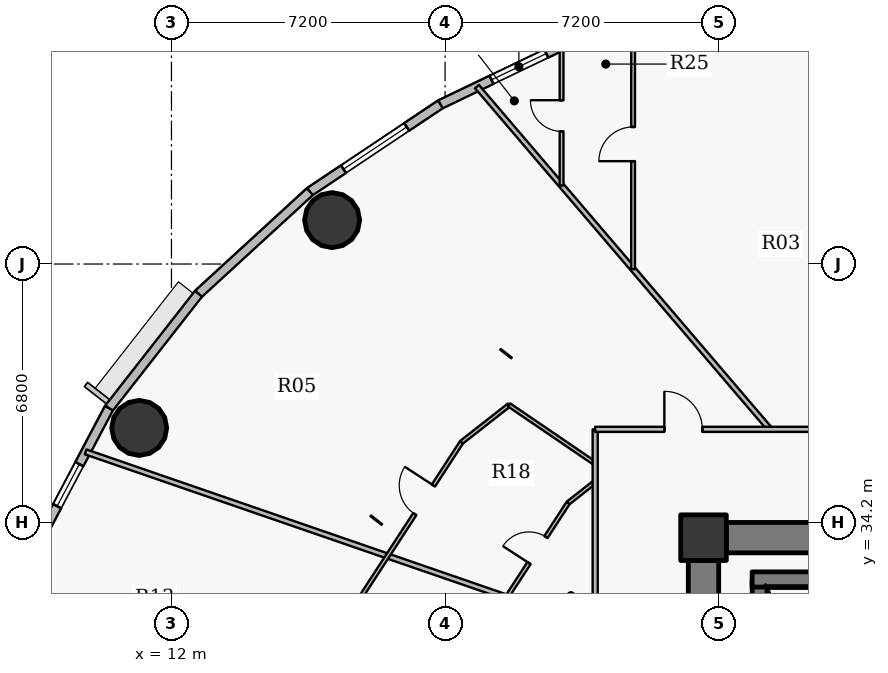
"""IFC4 building model, lengths in metres.
Left out: names, types, materials, properties, quantities, classifications, styles, units other than length and angle.
Written with IfcOpenShell. Run it as: python <this file> out.ifc"""

import sys

from ifc_helpers import new_model, si_unit, direction, frame, frame_2d, origin, origin_2d, place, context, subcontext, project, spatial, rectangle, hollow_circle, extrude, source, transform, mapped, element, fill, save


model = new_model("IFC4")
c1 = context("Model", 3, precision=1e-05, world=origin(), true_north=direction((0.0, 1.0)))
c2 = subcontext(c1, "Body", "Model", "MODEL_VIEW")
j1 = project(units=[si_unit("LENGTHUNIT", "METRE"), si_unit("PLANEANGLEUNIT", "RADIAN")], contexts=[c1])
p1 = place(None, origin())
s1 = spatial("IfcSite", under=j1, at=p1, CompositionType="ELEMENT")
p2 = place(p1, origin())
s2 = spatial("IfcBuilding", under=s1, at=p2, CompositionType="ELEMENT")
p3 = place(p2, frame((0.0, 0.0, 97.2)))
s3 = spatial("IfcBuildingStorey", under=s2, at=p3, CompositionType="ELEMENT", Elevation=97.2)
p4 = place(p3, frame((26.0, 33.8, 0.0), z_axis=(0.0, 0.0, 1.0), x_axis=(1.0, 0.0, 0.0)))
e1 = element("IfcColumn", 1, at=p4, inside=s3, PredefinedType="COLUMN", context=c2, shape_type="SweptSolid", body=[
    extrude(rectangle(XDim=1.2, YDim=1.2, at=origin_2d()), origin(), (0.0, 0.0, 1.0), 3.75),
])
p5 = place(p3, frame((27.48, 24.1, 0.0), z_axis=(0.0, 0.0, 1.0), x_axis=(0.0, 1.0, 0.0)))
e2 = element("IfcWall", 2, at=p5, inside=s3, PredefinedType="SHEAR", context=c2, shape_type="SweptSolid", body=[
    extrude(rectangle(XDim=8.6, YDim=0.4, at=frame_2d((4.3, 0.0))), origin(), (0.0, 0.0, 1.0), 3.75),
])
p6 = place(p3, frame((27.28, 32.7, 0.0), z_axis=(0.0, 0.0, 1.0), x_axis=(1.0, 0.0, 0.0)))
e3 = element("IfcWall", 3, at=p6, inside=s3, PredefinedType="SHEAR", context=c2, shape_type="SweptSolid", body=[
    extrude(rectangle(XDim=4.1, YDim=0.4, at=frame_2d((2.05, 0.0))), origin(), (0.0, 0.0, 1.0), 3.75),
])
p7 = place(p3, frame((26.6, 33.8, 0.0), z_axis=(0.0, 0.0, 1.0), x_axis=(1.0, 0.0, 0.0)))
e4 = element("IfcWall", 4, at=p7, inside=s3, PredefinedType="SHEAR", context=c2, shape_type="SweptSolid", body=[
    extrude(rectangle(XDim=18.8, YDim=0.8, at=frame_2d((9.4, 0.0))), origin(), (0.0, 0.0, 1.0), 2.95),
])
p8 = place(p3, frame((26.0, 20.8, 0.0), z_axis=(0.0, 0.0, 1.0), x_axis=(0.0, 1.0, 0.0)))
e5 = element("IfcWall", 5, at=p8, inside=s3, PredefinedType="SHEAR", context=c2, shape_type="SweptSolid", body=[
    extrude(rectangle(XDim=12.4, YDim=0.8, at=frame_2d((6.2, 0.0))), origin(), (0.0, 0.0, 1.0), 2.95),
])
p9 = place(p8, frame((5.79, 0.0, 0.0)))
e6 = element("IfcOpeningElement", 6, at=p9, cuts=e5, PredefinedType="OPENING", context=c2, shape_type="SweptSolid", body=[
    extrude(rectangle(XDim=0.82, YDim=2.1, at=origin_2d()), frame((0.41, 0.41, 1.05), z_axis=(0.0, -1.0, 0.0), x_axis=(1.0, 0.0, 0.0)), (0.0, 0.0, 1.0), 0.82),
])
for number, where, z_axis, x_axis in (
    (7, (16.227, 42.156, 0.0), (0.0, 0.0, 1.0), (1.0, 0.0, 0.0)),
    (8, (11.151, 36.688, 0.0), (0.0, 0.0, 1.0), (1.0, 0.0, 0.0)),
):
    element("IfcColumn", number, at=place(p3, frame(where, z_axis=z_axis, x_axis=x_axis)), inside=s3, PredefinedType="COLUMN", context=c2, shape_type="SweptSolid", body=[
        extrude(hollow_circle(Radius=0.725, WallThickness=0.042, at=origin_2d()), origin(), (0.0, 0.0, 1.0), 3.75),
    ])
p10 = place(p3, frame((19.075, 45.199, 0.0), z_axis=(0.0, 0.0, 1.0), x_axis=(0.901589935876, 0.432591709962, 0.0)))
e9 = element("IfcWall", 9, at=p10, inside=s3, PredefinedType="SOLIDWALL", context=c2, shape_type="SweptSolid", body=[
    extrude(rectangle(XDim=4.272, YDim=0.24, at=frame_2d((2.136, 0.0))), origin(), (0.0, 0.0, 1.0), 3.5),
])
p11 = place(p10, frame((1.493, 0.0, 0.9)))
e10 = element("IfcOpeningElement", 10, at=p11, cuts=e9, PredefinedType="OPENING", context=c2, shape_type="SweptSolid", body=[
    extrude(rectangle(XDim=1.6, YDim=1.75, at=origin_2d()), frame((0.8, 0.13, 0.875), z_axis=(0.0, -1.0, 0.0), x_axis=(1.0, 0.0, 0.0)), (0.0, 0.0, 1.0), 0.26),
])
p12 = place(p3, frame((15.642, 42.903, 0.0), z_axis=(0.0, 0.0, 1.0), x_axis=(0.831221811447, 0.555940914284, 0.0)))
e11 = element("IfcWall", 11, at=p12, inside=s3, PredefinedType="SOLIDWALL", context=c2, shape_type="SweptSolid", body=[
    extrude(rectangle(XDim=4.13, YDim=0.24, at=frame_2d((2.065, 0.0))), origin(), (0.0, 0.0, 1.0), 3.5),
])
p13 = place(p12, frame((1.065, 0.0, 0.9)))
e12 = element("IfcOpeningElement", 12, at=p13, cuts=e11, PredefinedType="OPENING", context=c2, shape_type="SweptSolid", body=[
    extrude(rectangle(XDim=2.0, YDim=1.75, at=origin_2d()), frame((1.0, 0.13, 0.875), z_axis=(0.0, -1.0, 0.0), x_axis=(1.0, 0.0, 0.0)), (0.0, 0.0, 1.0), 0.26),
])
p14 = place(p3, frame((12.711, 40.217, 0.0), z_axis=(0.0, 0.0, 1.0), x_axis=(0.737113356241, 0.675769117414, 0.0)))
e13 = element("IfcWall", 13, at=p14, inside=s3, PredefinedType="SOLIDWALL", context=c2, shape_type="SweptSolid", body=[
    extrude(rectangle(XDim=3.976, YDim=0.24, at=frame_2d((1.988, 0.0))), origin(), (0.0, 0.0, 1.0), 3.5),
])
p15 = place(p3, frame((10.355, 37.206, 0.0), z_axis=(0.0, 0.0, 1.0), x_axis=(0.616272103517, 0.787533297345, 0.0)))
e14 = element("IfcWall", 14, at=p15, inside=s3, PredefinedType="SOLIDWALL", context=c2, shape_type="SweptSolid", body=[
    extrude(rectangle(XDim=3.823, YDim=0.24, at=frame_2d((1.912, 0.0))), origin(), (0.0, 0.0, 1.0), 3.5),
])
p16 = place(p3, frame((8.63, 33.945, 0.0), z_axis=(0.0, 0.0, 1.0), x_axis=(0.467614004126, 0.883932770716, 0.0)))
e15 = element("IfcWall", 15, at=p16, inside=s3, PredefinedType="SOLIDWALL", context=c2, shape_type="SweptSolid", body=[
    extrude(rectangle(XDim=3.689, YDim=0.24, at=frame_2d((1.844, 0.0))), origin(), (0.0, 0.0, 1.0), 3.5),
])
p17 = place(p16, frame((0.774, 0.0, 0.9)))
e16 = element("IfcOpeningElement", 16, at=p17, cuts=e15, PredefinedType="OPENING", context=c2, shape_type="SweptSolid", body=[
    extrude(rectangle(XDim=1.25, YDim=1.65, at=origin_2d()), frame((0.625, 0.13, 0.825), z_axis=(0.0, -1.0, 0.0), x_axis=(1.0, 0.0, 0.0)), (0.0, 0.0, 1.0), 0.26),
])
p18 = place(p3, frame((9.741, 36.057, 0.0), z_axis=(0.0, 0.0, 1.0), x_axis=(0.945349748634, -0.326058051207, 0.0)))
e17 = element("IfcWall", 17, at=p18, inside=s3, PredefinedType="PARTITIONING", context=c2, shape_type="SweptSolid", body=[
    extrude(rectangle(XDim=14.184, YDim=0.135, at=frame_2d((7.092, 0.0))), origin(), (0.0, 0.0, 1.0), 2.935),
])
p19 = place(p3, frame((16.76, 31.895, 0.0), z_axis=(0.0, 0.0, 1.0), x_axis=(0.545405249109, 0.838172484781, 0.0)))
e18 = element("IfcWall", 18, at=p19, inside=s3, PredefinedType="PARTITIONING", context=c2, shape_type="SweptSolid", body=[
    extrude(rectangle(XDim=5.269, YDim=0.1, at=frame_2d((2.634, 0.0))), origin(), (0.0, 0.0, 1.0), 2.935),
])
p20 = place(p19, frame((3.012, 0.0, 0.0)))
e19 = element("IfcOpeningElement", 19, at=p20, cuts=e18, PredefinedType="OPENING", context=c2, shape_type="SweptSolid", body=[
    extrude(rectangle(XDim=0.9, YDim=2.1, at=origin_2d()), frame((0.45, 0.06, 1.05), z_axis=(0.0, -1.0, 0.0), x_axis=(1.0, 0.0, 0.0)), (0.0, 0.0, 1.0), 0.12),
])
p21 = place(p3, frame((19.634, 36.311, 0.0), z_axis=(0.0, 0.0, 1.0), x_axis=(0.787313775385, 0.616552527437, 0.0)))
e20 = element("IfcWall", 20, at=p21, inside=s3, PredefinedType="PARTITIONING", context=c2, shape_type="SweptSolid", body=[
    extrude(rectangle(XDim=1.59, YDim=0.1, at=frame_2d((0.795, 0.0))), origin(), (0.0, 0.0, 1.0), 3.5),
])
p22 = place(p3, frame((20.04, 45.668, 0.0), z_axis=(0.0, 0.0, 1.0), x_axis=(0.649828321201, -0.760081017369, 0.0)))
e21 = element("IfcWall", 21, at=p22, inside=s3, PredefinedType="PARTITIONING", context=c2, shape_type="SweptSolid", body=[
    extrude(rectangle(XDim=11.865, YDim=0.135, at=frame_2d((5.932, 0.0))), origin(), (0.0, 0.0, 1.0), 2.935),
])
p23 = place(p3, frame((20.825, 32.234, 0.0), z_axis=(0.0, 0.0, 1.0), x_axis=(0.545376787896, 0.838191004023, 0.0)))
e22 = element("IfcWall", 22, at=p23, inside=s3, PredefinedType="PARTITIONING", context=c2, shape_type="SweptSolid", body=[
    extrude(rectangle(XDim=2.96, YDim=0.1, at=frame_2d((1.48, 0.0))), origin(), (0.0, 0.0, 1.0), 2.935),
])
p24 = place(p23, frame((1.07, 0.0, 0.0)))
e23 = element("IfcOpeningElement", 23, at=p24, cuts=e22, PredefinedType="OPENING", context=c2, shape_type="SweptSolid", body=[
    extrude(rectangle(XDim=0.82, YDim=2.1, at=origin_2d()), frame((0.41, 0.06, 1.05), z_axis=(0.0, -1.0, 0.0), x_axis=(1.0, 0.0, 0.0)), (0.0, 0.0, 1.0), 0.12),
])
p25 = place(p3, frame((20.885, 37.291, 0.0), z_axis=(0.0, 0.0, 1.0), x_axis=(0.826581607155, -0.562816885596, 0.0)))
e24 = element("IfcWall", 24, at=p25, inside=s3, PredefinedType="PARTITIONING", context=c2, shape_type="SweptSolid", body=[
    extrude(rectangle(XDim=2.74, YDim=0.1, at=frame_2d((1.37, 0.0))), origin(), (0.0, 0.0, 1.0), 3.5),
])
p26 = place(p3, frame((22.265, 43.064, 0.0), z_axis=(0.0, 0.0, 1.0), x_axis=(0.0, 1.0, 0.0)))
e25 = element("IfcWall", 25, at=p26, inside=s3, PredefinedType="PARTITIONING", context=c2, shape_type="SweptSolid", body=[
    extrude(rectangle(XDim=3.671, YDim=0.1, at=frame_2d((1.836, 0.0))), origin(), (0.0, 0.0, 1.0), 2.935),
])
p27 = place(p26, frame((1.426, 0.0, 0.0)))
e26 = element("IfcOpeningElement", 26, at=p27, cuts=e25, PredefinedType="OPENING", context=c2, shape_type="SweptSolid", body=[
    extrude(rectangle(XDim=0.82, YDim=2.1, at=origin_2d()), frame((0.41, 0.06, 1.05), z_axis=(0.0, -1.0, 0.0), x_axis=(1.0, 0.0, 0.0)), (0.0, 0.0, 1.0), 0.12),
])
p28 = place(p3, frame((22.439, 34.715, 0.0), z_axis=(0.0, 0.0, 1.0), x_axis=(0.787265250498, 0.616614486821, 0.0)))
e27 = element("IfcWall", 27, at=p28, inside=s3, PredefinedType="PARTITIONING", context=c2, shape_type="SweptSolid", body=[
    extrude(rectangle(XDim=0.903, YDim=0.1, at=frame_2d((0.451, 0.0))), origin(), (0.0, 0.0, 1.0), 3.5),
])
p29 = place(p3, frame((23.15, 17.35, 0.0), z_axis=(0.0, 0.0, 1.0), x_axis=(0.0, 1.0, 0.0)))
e28 = element("IfcWall", 28, at=p29, inside=s3, PredefinedType="PARTITIONING", context=c2, shape_type="SweptSolid", body=[
    extrude(rectangle(XDim=19.3, YDim=0.135, at=frame_2d((9.65, 0.0))), origin(), (0.0, 0.0, 1.0), 2.935),
])
p30 = place(p29, frame((7.86, 0.0, 0.0)))
e29 = element("IfcOpeningElement", 29, at=p30, cuts=e28, PredefinedType="OPENING", context=c2, shape_type="SweptSolid", body=[
    extrude(rectangle(XDim=1.0, YDim=2.15, at=origin_2d()), frame((0.5, 0.078, 1.075), z_axis=(0.0, -1.0, 0.0), x_axis=(1.0, 0.0, 0.0)), (0.0, 0.0, 1.0), 0.155),
])
p31 = place(p3, frame((23.15, 36.65, 0.0), z_axis=(0.0, 0.0, 1.0), x_axis=(1.0, 0.0, 0.0)))
e30 = element("IfcWall", 30, at=p31, inside=s3, PredefinedType="PARTITIONING", context=c2, shape_type="SweptSolid", body=[
    extrude(rectangle(XDim=10.373, YDim=0.135, at=frame_2d((5.187, 0.0))), origin(), (0.0, 0.0, 1.0), 2.935),
])
p32 = place(p31, frame((6.966, 0.0, 0.0)))
e31 = element("IfcOpeningElement", 31, at=p32, cuts=e30, PredefinedType="OPENING", context=c2, shape_type="SweptSolid", body=[
    extrude(rectangle(XDim=1.0, YDim=2.15, at=origin_2d()), frame((0.5, 0.078, 1.075), z_axis=(0.0, -1.0, 0.0), x_axis=(1.0, 0.0, 0.0)), (0.0, 0.0, 1.0), 0.155),
])
p33 = place(p31, frame((1.82, 0.0, 0.0)))
e32 = element("IfcOpeningElement", 32, at=p33, cuts=e30, PredefinedType="OPENING", context=c2, shape_type="SweptSolid", body=[
    extrude(rectangle(XDim=1.0, YDim=2.15, at=origin_2d()), frame((0.5, 0.078, 1.075), z_axis=(0.0, -1.0, 0.0), x_axis=(1.0, 0.0, 0.0)), (0.0, 0.0, 1.0), 0.155),
])
p34 = place(p3, frame((24.147, 40.864, 0.0), z_axis=(0.0, 0.0, 1.0), x_axis=(0.0, 1.0, 0.0)))
e33 = element("IfcWall", 33, at=p34, inside=s3, PredefinedType="PARTITIONING", context=c2, shape_type="SweptSolid", body=[
    extrude(rectangle(XDim=6.585, YDim=0.1, at=frame_2d((3.292, 0.0))), origin(), (0.0, 0.0, 1.0), 2.935),
])
p35 = place(p34, frame((2.843, 0.0, 0.0)))
e34 = element("IfcOpeningElement", 34, at=p35, cuts=e33, PredefinedType="OPENING", context=c2, shape_type="SweptSolid", body=[
    extrude(rectangle(XDim=0.9, YDim=2.1, at=origin_2d()), frame((0.45, 0.06, 1.05), z_axis=(0.0, -1.0, 0.0), x_axis=(1.0, 0.0, 0.0)), (0.0, 0.0, 1.0), 0.12),
])
p36 = place(p3, frame((26.59, 34.2, 0.0), z_axis=(0.0, 0.0, 1.0), x_axis=(-1.0, 0.0, 0.0)))
e35 = element("IfcWall", 35, at=p36, inside=s3, PredefinedType="PARTITIONING", context=c2, shape_type="SweptSolid", body=[
    extrude(rectangle(XDim=0.99, YDim=0.135, at=frame_2d((0.495, 0.0))), origin(), (0.0, 0.0, 1.0), 2.935),
])
p37 = place(p3, frame((25.6, 33.893, 0.0), z_axis=(0.0, 0.0, 1.0), x_axis=(0.0, -1.0, 0.0)))
e36 = element("IfcWall", 36, at=p37, inside=s3, PredefinedType="PARTITIONING", context=c2, shape_type="SweptSolid", body=[
    extrude(rectangle(XDim=0.683, YDim=0.135, at=frame_2d((0.341, 0.0))), origin(), (0.0, 0.0, 1.0), 3.5),
])
m1 = source(origin(), c2, "Body", "SweptSolid", [
    extrude(rectangle(XDim=1.6, YDim=1.75, at=origin_2d()), frame((0.8, 0.03, 0.875), z_axis=(0.0, -1.0, 0.0), x_axis=(1.0, 0.0, 0.0)), (0.0, 0.0, 1.0), 0.06),
])
p38 = place(p11, origin())
e37 = element("IfcWindow", 37, at=p38, inside=s3, PartitioningType="DOUBLE_PANEL_VERTICAL", PredefinedType="WINDOW", context=c2, shape_type="MappedRepresentation", body=[
    mapped(m1, transform((0.0, 0.0, 0.0), x_axis=(1.0, 0.0, 0.0), y_axis=(0.0, 1.0, 0.0), z_axis=(0.0, 0.0, 1.0), scale=1.0)),
])
fill(e10, e37)
m2 = source(origin(), c2, "Body", "SweptSolid", [
    extrude(rectangle(XDim=2.0, YDim=1.75, at=origin_2d()), frame((1.0, 0.03, 0.875), z_axis=(0.0, -1.0, 0.0), x_axis=(1.0, 0.0, 0.0)), (0.0, 0.0, 1.0), 0.06),
])
p39 = place(p13, origin())
e38 = element("IfcWindow", 38, at=p39, inside=s3, PartitioningType="DOUBLE_PANEL_VERTICAL", PredefinedType="WINDOW", context=c2, shape_type="MappedRepresentation", body=[
    mapped(m2, transform((0.0, 0.0, 0.0), x_axis=(1.0, 0.0, 0.0), y_axis=(0.0, 1.0, 0.0), z_axis=(0.0, 0.0, 1.0), scale=1.0)),
])
fill(e12, e38)
m3 = source(origin(), c2, "Body", "SweptSolid", [
    extrude(rectangle(XDim=1.25, YDim=1.65, at=origin_2d()), frame((0.625, 0.03, 0.825), z_axis=(0.0, -1.0, 0.0), x_axis=(1.0, 0.0, 0.0)), (0.0, 0.0, 1.0), 0.06),
])
p40 = place(p17, origin())
e39 = element("IfcWindow", 39, at=p40, inside=s3, PartitioningType="SINGLE_PANEL", PredefinedType="WINDOW", context=c2, shape_type="MappedRepresentation", body=[
    mapped(m3, transform((0.0, 0.0, 0.0), x_axis=(1.0, 0.0, 0.0), y_axis=(0.0, 1.0, 0.0), z_axis=(0.0, 0.0, 1.0), scale=1.0)),
])
fill(e16, e39)
m4 = source(origin(), c2, "Body", "SweptSolid", [
    extrude(rectangle(XDim=0.9, YDim=2.1, at=origin_2d()), frame((0.45, 0.025, 1.05), z_axis=(0.0, -1.0, 0.0), x_axis=(1.0, 0.0, 0.0)), (0.0, 0.0, 1.0), 0.05),
])
p41 = place(p35, origin())
e40 = element("IfcDoor", 40, at=p41, inside=s3, OperationType="SINGLE_SWING_LEFT", PredefinedType="DOOR", context=c2, shape_type="MappedRepresentation", body=[
    mapped(m4, transform((0.0, 0.0, 0.0), x_axis=(1.0, 0.0, 0.0), y_axis=(0.0, 1.0, 0.0), z_axis=(0.0, 0.0, 1.0), scale=1.0)),
])
fill(e34, e40)
m5 = source(origin(), c2, "Body", "SweptSolid", [
    extrude(rectangle(XDim=0.82, YDim=2.1, at=origin_2d()), frame((0.41, 0.025, 1.05), z_axis=(0.0, -1.0, 0.0), x_axis=(1.0, 0.0, 0.0)), (0.0, 0.0, 1.0), 0.05),
])
p42 = place(p27, origin())
e41 = element("IfcDoor", 41, at=p42, inside=s3, OperationType="SINGLE_SWING_RIGHT", PredefinedType="DOOR", context=c2, shape_type="MappedRepresentation", body=[
    mapped(m5, transform((0.0, 0.0, 0.0), x_axis=(1.0, 0.0, 0.0), y_axis=(0.0, 1.0, 0.0), z_axis=(0.0, 0.0, 1.0), scale=1.0)),
])
fill(e26, e41)
m6 = source(origin(), c2, "Body", "SweptSolid", [
    extrude(rectangle(XDim=1.0, YDim=2.15, at=origin_2d()), frame((0.5, 0.025, 1.075), z_axis=(0.0, -1.0, 0.0), x_axis=(1.0, 0.0, 0.0)), (0.0, 0.0, 1.0), 0.05),
])
p43 = place(p33, origin())
e42 = element("IfcDoor", 42, at=p43, inside=s3, OperationType="SINGLE_SWING_LEFT", PredefinedType="DOOR", context=c2, shape_type="MappedRepresentation", body=[
    mapped(m6, transform((0.0, 0.0, 0.0), x_axis=(1.0, 0.0, 0.0), y_axis=(0.0, 1.0, 0.0), z_axis=(0.0, 0.0, 1.0), scale=1.0)),
])
fill(e32, e42)
p44 = place(p20, origin())
e43 = element("IfcDoor", 43, at=p44, inside=s3, OperationType="SINGLE_SWING_RIGHT", PredefinedType="DOOR", context=c2, shape_type="MappedRepresentation", body=[
    mapped(m4, transform((0.0, 0.0, 0.0), x_axis=(1.0, 0.0, 0.0), y_axis=(0.0, 1.0, 0.0), z_axis=(0.0, 0.0, 1.0), scale=1.0)),
])
fill(e19, e43)
p45 = place(p24, origin())
e44 = element("IfcDoor", 44, at=p45, inside=s3, OperationType="SINGLE_SWING_LEFT", PredefinedType="DOOR", context=c2, shape_type="MappedRepresentation", body=[
    mapped(m5, transform((0.0, 0.0, 0.0), x_axis=(1.0, 0.0, 0.0), y_axis=(0.0, 1.0, 0.0), z_axis=(0.0, 0.0, 1.0), scale=1.0)),
])
fill(e23, e44)
save(model, sys.argv[1])
